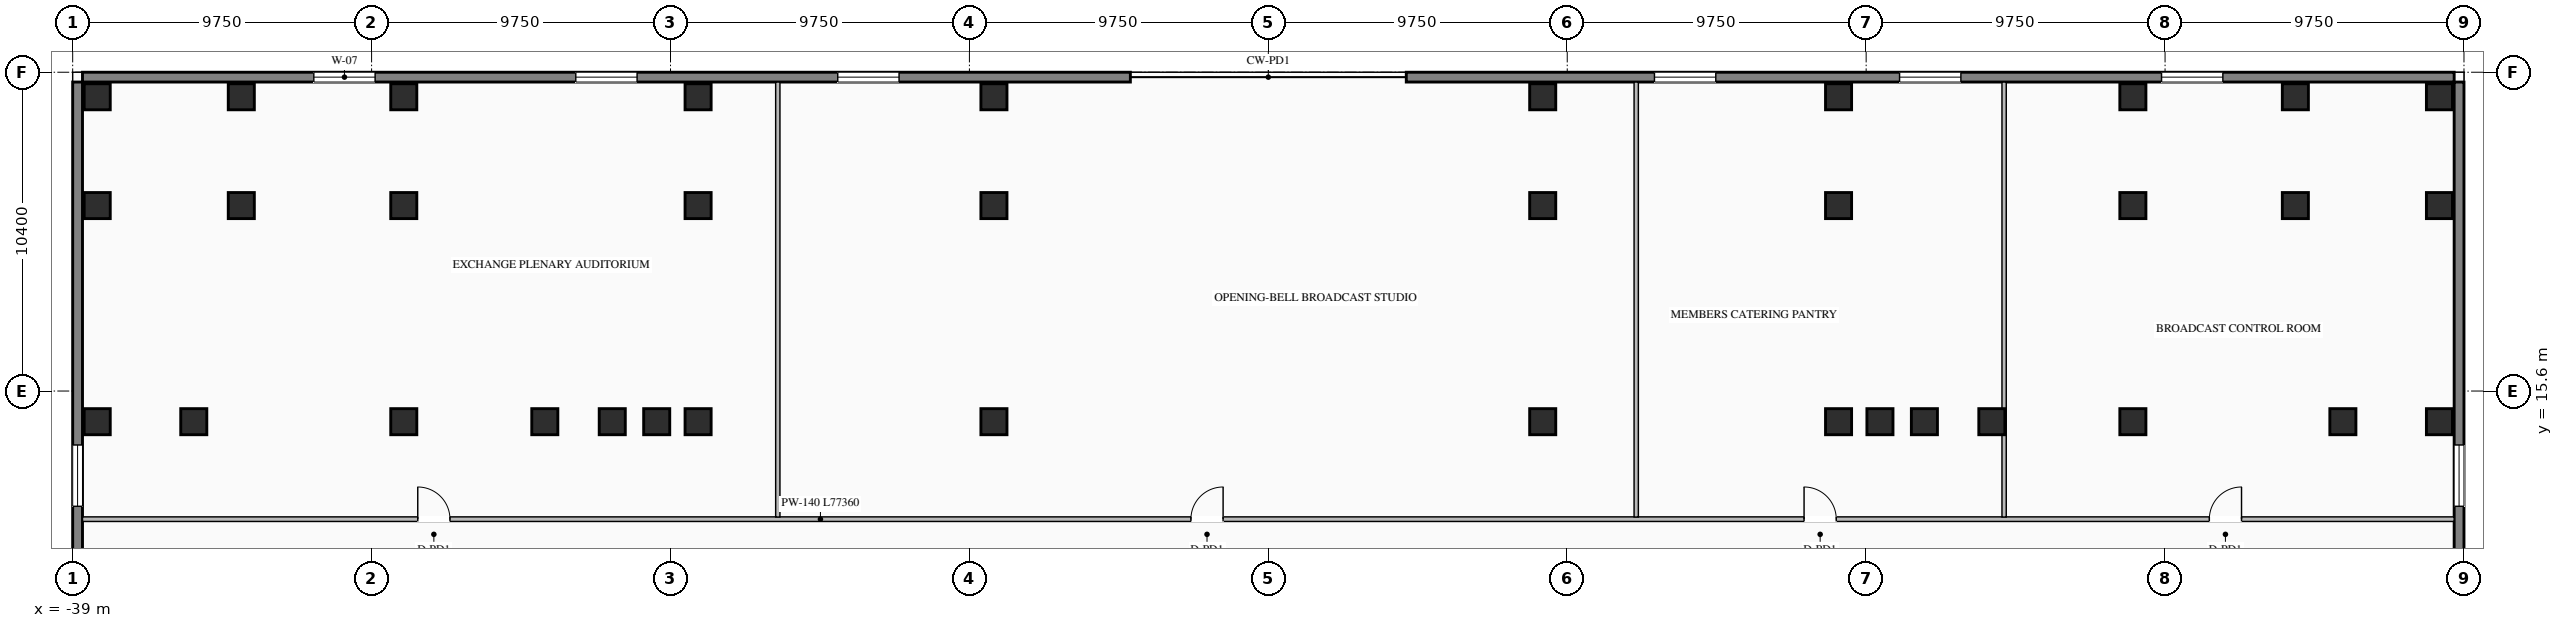
"""IFC4 building model, lengths in metres.
Left out: names, types, materials, properties, quantities, classifications, styles, units other than length and angle.
Written with IfcOpenShell. Run it as: python <this file> out.ifc"""

import sys

from ifc_helpers import new_model, si_unit, direction, frame, frame_2d, origin, origin_2d, place, context, subcontext, project, spatial, rectangle, i_section, extrude, element, fill, save


model = new_model("IFC4")
c1 = context("Model", 3, precision=1e-05, world=origin(), true_north=direction((0.0, 1.0)))
c2 = subcontext(c1, "Body", "Model", "MODEL_VIEW")
j1 = project(units=[si_unit("LENGTHUNIT", "METRE"), si_unit("PLANEANGLEUNIT", "RADIAN")], contexts=[c1])
p1 = place(None, origin())
s1 = spatial("IfcSite", under=j1, at=p1, CompositionType="ELEMENT")
p2 = place(p1, origin())
s2 = spatial("IfcBuilding", under=s1, at=p2, CompositionType="ELEMENT")
p3 = place(p2, frame((0.0, 0.0, 14.1)))
s3 = spatial("IfcBuildingStorey", under=s2, at=p3, CompositionType="ELEMENT", Elevation=14.1)
for number, where, z_axis, x_axis in (
    (1, (-21.4, 14.6, 0.0), (0.0, 0.0, 1.0), (1.0, 0.0, 0.0)),
    (2, (-19.95, 14.6, 0.0), (0.0, 0.0, 1.0), (1.0, 0.0, 0.0)),
    (3, (-18.6, 14.6, 0.0), (0.0, 0.0, 1.0), (1.0, 0.0, 0.0)),
    (4, (-8.95, 14.6, 0.0), (0.0, 0.0, 1.0), (1.0, 0.0, 0.0)),
    (5, (8.95, 14.6, 0.0), (0.0, 0.0, 1.0), (1.0, 0.0, 0.0)),
    (6, (18.6, 14.6, 0.0), (0.0, 0.0, 1.0), (1.0, 0.0, 0.0)),
    (7, (19.95, 14.6, 0.0), (0.0, 0.0, 1.0), (1.0, 0.0, 0.0)),
    (8, (21.4, 14.6, 0.0), (0.0, 0.0, 1.0), (1.0, 0.0, 0.0)),
    (9, (-23.6, 14.6, 0.0), (0.0, 0.0, 1.0), (1.0, 0.0, 0.0)),
    (10, (23.6, 14.6, 0.0), (0.0, 0.0, 1.0), (1.0, 0.0, 0.0)),
    (11, (-28.2, 14.6, 0.0), (0.0, 0.0, 1.0), (1.0, 0.0, 0.0)),
    (12, (28.2, 14.6, 0.0), (0.0, 0.0, 1.0), (1.0, 0.0, 0.0)),
    (13, (-35.05, 14.6, 0.0), (0.0, 0.0, 1.0), (1.0, 0.0, 0.0)),
    (14, (35.05, 14.6, 0.0), (0.0, 0.0, 1.0), (1.0, 0.0, 0.0)),
    (15, (-38.2, 21.65, 0.0), (0.0, 0.0, 1.0), (1.0, 0.0, 0.0)),
    (16, (-33.5, 21.65, 0.0), (0.0, 0.0, 1.0), (1.0, 0.0, 0.0)),
    (17, (-28.2, 21.65, 0.0), (0.0, 0.0, 1.0), (1.0, 0.0, 0.0)),
    (18, (-18.6, 21.65, 0.0), (0.0, 0.0, 1.0), (1.0, 0.0, 0.0)),
    (19, (-8.95, 21.65, 0.0), (0.0, 0.0, 1.0), (1.0, 0.0, 0.0)),
    (20, (8.95, 21.65, 0.0), (0.0, 0.0, 1.0), (1.0, 0.0, 0.0)),
    (21, (18.6, 21.65, 0.0), (0.0, 0.0, 1.0), (1.0, 0.0, 0.0)),
    (22, (28.2, 21.65, 0.0), (0.0, 0.0, 1.0), (1.0, 0.0, 0.0)),
    (23, (33.5, 21.65, 0.0), (0.0, 0.0, 1.0), (1.0, 0.0, 0.0)),
    (24, (38.2, 21.65, 0.0), (0.0, 0.0, 1.0), (1.0, 0.0, 0.0)),
    (25, (-38.2, 25.2, 0.0), (0.0, 0.0, 1.0), (1.0, 0.0, 0.0)),
    (26, (-33.5, 25.2, 0.0), (0.0, 0.0, 1.0), (1.0, 0.0, 0.0)),
    (27, (-28.2, 25.2, 0.0), (0.0, 0.0, 1.0), (1.0, 0.0, 0.0)),
    (28, (-18.6, 25.2, 0.0), (0.0, 0.0, 1.0), (1.0, 0.0, 0.0)),
    (29, (-8.95, 25.2, 0.0), (0.0, 0.0, 1.0), (1.0, 0.0, 0.0)),
    (30, (8.95, 25.2, 0.0), (0.0, 0.0, 1.0), (1.0, 0.0, 0.0)),
    (31, (18.6, 25.2, 0.0), (0.0, 0.0, 1.0), (1.0, 0.0, 0.0)),
    (32, (28.2, 25.2, 0.0), (0.0, 0.0, 1.0), (1.0, 0.0, 0.0)),
    (33, (33.5, 25.2, 0.0), (0.0, 0.0, 1.0), (1.0, 0.0, 0.0)),
    (34, (38.2, 25.2, 0.0), (0.0, 0.0, 1.0), (1.0, 0.0, 0.0)),
    (35, (-38.2, 14.6, 0.0), (0.0, 0.0, 1.0), (1.0, 0.0, 0.0)),
    (36, (38.2, 14.6, 0.0), (0.0, 0.0, 1.0), (1.0, 0.0, 0.0)),
):
    element("IfcColumn", number, at=place(p3, frame(where, z_axis=z_axis, x_axis=x_axis)), inside=s3, PredefinedType="COLUMN", context=c2, shape_type="SweptSolid", body=[
        extrude(i_section(OverallWidth=0.85, OverallDepth=0.85, WebThickness=0.032, FlangeThickness=0.048, at=origin_2d()), origin(), (0.0, 0.0, 1.0), 4.5),
    ])
p4 = place(p3, frame((-38.68, 25.84, 0.0), z_axis=(0.0, 0.0, 1.0), x_axis=(1.0, 0.0, 0.0)))
e37 = element("IfcWall", 37, at=p4, inside=s3, PredefinedType="STANDARD", context=c2, shape_type="SweptSolid", body=[
    extrude(rectangle(XDim=34.18, YDim=0.32, at=frame_2d((17.09, 0.0))), origin(), (0.0, 0.0, 1.0), 4.23),
])
p5 = place(p4, frame((7.545, 0.0, 0.8)))
e38 = element("IfcOpeningElement", 38, at=p5, cuts=e37, PredefinedType="OPENING", context=c2, shape_type="SweptSolid", body=[
    extrude(rectangle(XDim=2.0, YDim=2.2, at=frame_2d((1.0, 1.1))), frame((0.0, 0.17, 0.0), z_axis=(0.0, -1.0, 0.0), x_axis=(1.0, 0.0, 0.0)), (0.0, 0.0, 1.0), 0.34),
])
p6 = place(p4, frame((16.09, 0.0, 0.8)))
e39 = element("IfcOpeningElement", 39, at=p6, cuts=e37, PredefinedType="OPENING", context=c2, shape_type="SweptSolid", body=[
    extrude(rectangle(XDim=2.0, YDim=2.2, at=frame_2d((1.0, 1.1))), frame((0.0, 0.17, 0.0), z_axis=(0.0, -1.0, 0.0), x_axis=(1.0, 0.0, 0.0)), (0.0, 0.0, 1.0), 0.34),
])
p7 = place(p4, frame((24.635, 0.0, 0.8)))
e40 = element("IfcOpeningElement", 40, at=p7, cuts=e37, PredefinedType="OPENING", context=c2, shape_type="SweptSolid", body=[
    extrude(rectangle(XDim=2.0, YDim=2.2, at=frame_2d((1.0, 1.1))), frame((0.0, 0.17, 0.0), z_axis=(0.0, -1.0, 0.0), x_axis=(1.0, 0.0, 0.0)), (0.0, 0.0, 1.0), 0.34),
])
p8 = place(p3, frame((4.5, 25.84, 0.0), z_axis=(0.0, 0.0, 1.0), x_axis=(1.0, 0.0, 0.0)))
e41 = element("IfcWall", 41, at=p8, inside=s3, PredefinedType="STANDARD", context=c2, shape_type="SweptSolid", body=[
    extrude(rectangle(XDim=34.18, YDim=0.32, at=frame_2d((17.09, 0.0))), origin(), (0.0, 0.0, 1.0), 4.23),
])
p9 = place(p8, frame((8.095, 0.0, 0.8)))
e42 = element("IfcOpeningElement", 42, at=p9, cuts=e41, PredefinedType="OPENING", context=c2, shape_type="SweptSolid", body=[
    extrude(rectangle(XDim=2.0, YDim=2.2, at=frame_2d((1.0, 1.1))), frame((0.0, 0.17, 0.0), z_axis=(0.0, -1.0, 0.0), x_axis=(1.0, 0.0, 0.0)), (0.0, 0.0, 1.0), 0.34),
])
p10 = place(p8, frame((16.09, 0.0, 0.8)))
e43 = element("IfcOpeningElement", 43, at=p10, cuts=e41, PredefinedType="OPENING", context=c2, shape_type="SweptSolid", body=[
    extrude(rectangle(XDim=2.0, YDim=2.2, at=frame_2d((1.0, 1.1))), frame((0.0, 0.17, 0.0), z_axis=(0.0, -1.0, 0.0), x_axis=(1.0, 0.0, 0.0)), (0.0, 0.0, 1.0), 0.34),
])
p11 = place(p8, frame((24.635, 0.0, 0.8)))
e44 = element("IfcOpeningElement", 44, at=p11, cuts=e41, PredefinedType="OPENING", context=c2, shape_type="SweptSolid", body=[
    extrude(rectangle(XDim=2.0, YDim=2.2, at=frame_2d((1.0, 1.1))), frame((0.0, 0.17, 0.0), z_axis=(0.0, -1.0, 0.0), x_axis=(1.0, 0.0, 0.0)), (0.0, 0.0, 1.0), 0.34),
])
p12 = place(p3, frame((-38.84, -25.68, 0.0), z_axis=(0.0, 0.0, 1.0), x_axis=(0.0, 1.0, 0.0)))
e45 = element("IfcWall", 45, at=p12, inside=s3, PredefinedType="STANDARD", context=c2, shape_type="SweptSolid", body=[
    extrude(rectangle(XDim=51.36, YDim=0.32, at=frame_2d((25.68, 0.0))), origin(), (0.0, 0.0, 1.0), 4.23),
])
p13 = place(p12, frame((11.84, 0.0, 0.8)))
e46 = element("IfcOpeningElement", 46, at=p13, cuts=e45, PredefinedType="OPENING", context=c2, shape_type="SweptSolid", body=[
    extrude(rectangle(XDim=2.0, YDim=2.2, at=frame_2d((1.0, 1.1))), frame((0.0, 0.17, 0.0), z_axis=(0.0, -1.0, 0.0), x_axis=(1.0, 0.0, 0.0)), (0.0, 0.0, 1.0), 0.34),
])
p14 = place(p12, frame((24.68, 0.0, 0.8)))
e47 = element("IfcOpeningElement", 47, at=p14, cuts=e45, PredefinedType="OPENING", context=c2, shape_type="SweptSolid", body=[
    extrude(rectangle(XDim=2.0, YDim=2.2, at=frame_2d((1.0, 1.1))), frame((0.0, 0.17, 0.0), z_axis=(0.0, -1.0, 0.0), x_axis=(1.0, 0.0, 0.0)), (0.0, 0.0, 1.0), 0.34),
])
p15 = place(p12, frame((37.52, 0.0, 0.8)))
e48 = element("IfcOpeningElement", 48, at=p15, cuts=e45, PredefinedType="OPENING", context=c2, shape_type="SweptSolid", body=[
    extrude(rectangle(XDim=2.0, YDim=2.2, at=frame_2d((1.0, 1.1))), frame((0.0, 0.17, 0.0), z_axis=(0.0, -1.0, 0.0), x_axis=(1.0, 0.0, 0.0)), (0.0, 0.0, 1.0), 0.34),
])
p16 = place(p3, frame((38.84, 25.68, 0.0), z_axis=(0.0, 0.0, 1.0), x_axis=(0.0, -1.0, 0.0)))
e49 = element("IfcWall", 49, at=p16, inside=s3, PredefinedType="STANDARD", context=c2, shape_type="SweptSolid", body=[
    extrude(rectangle(XDim=51.36, YDim=0.32, at=frame_2d((25.68, 0.0))), origin(), (0.0, 0.0, 1.0), 4.23),
])
p17 = place(p16, frame((11.84, 0.0, 0.8)))
e50 = element("IfcOpeningElement", 50, at=p17, cuts=e49, PredefinedType="OPENING", context=c2, shape_type="SweptSolid", body=[
    extrude(rectangle(XDim=2.0, YDim=2.2, at=frame_2d((1.0, 1.1))), frame((0.0, 0.17, 0.0), z_axis=(0.0, -1.0, 0.0), x_axis=(1.0, 0.0, 0.0)), (0.0, 0.0, 1.0), 0.34),
])
p18 = place(p16, frame((24.68, 0.0, 0.8)))
e51 = element("IfcOpeningElement", 51, at=p18, cuts=e49, PredefinedType="OPENING", context=c2, shape_type="SweptSolid", body=[
    extrude(rectangle(XDim=2.0, YDim=2.2, at=frame_2d((1.0, 1.1))), frame((0.0, 0.17, 0.0), z_axis=(0.0, -1.0, 0.0), x_axis=(1.0, 0.0, 0.0)), (0.0, 0.0, 1.0), 0.34),
])
p19 = place(p16, frame((37.52, 0.0, 0.8)))
e52 = element("IfcOpeningElement", 52, at=p19, cuts=e49, PredefinedType="OPENING", context=c2, shape_type="SweptSolid", body=[
    extrude(rectangle(XDim=2.0, YDim=2.2, at=frame_2d((1.0, 1.1))), frame((0.0, 0.17, 0.0), z_axis=(0.0, -1.0, 0.0), x_axis=(1.0, 0.0, 0.0)), (0.0, 0.0, 1.0), 0.34),
])
p20 = place(p3, frame((-38.68, 11.42, 0.0), z_axis=(0.0, 0.0, 1.0), x_axis=(1.0, 0.0, 0.0)))
e53 = element("IfcWall", 53, at=p20, inside=s3, PredefinedType="STANDARD", context=c2, shape_type="SweptSolid", body=[
    extrude(rectangle(XDim=77.36, YDim=0.15, at=frame_2d((38.68, 0.0))), origin(), (0.0, 0.0, 1.0), 4.23),
])
p21 = place(p20, frame((10.936, 0.0, 0.0)))
e54 = element("IfcOpeningElement", 54, at=p21, cuts=e53, PredefinedType="OPENING", context=c2, shape_type="SweptSolid", body=[
    extrude(rectangle(XDim=1.05, YDim=2.08, at=frame_2d((0.525, 1.04))), frame((0.0, 0.085, 0.0), z_axis=(0.0, -1.0, 0.0), x_axis=(1.0, 0.0, 0.0)), (0.0, 0.0, 1.0), 0.17),
])
p22 = place(p20, frame((36.155, 0.0, 0.0)))
e55 = element("IfcOpeningElement", 55, at=p22, cuts=e53, PredefinedType="OPENING", context=c2, shape_type="SweptSolid", body=[
    extrude(rectangle(XDim=1.05, YDim=2.08, at=frame_2d((0.525, 1.04))), frame((0.0, 0.085, 0.0), z_axis=(0.0, -1.0, 0.0), x_axis=(1.0, 0.0, 0.0)), (0.0, 0.0, 1.0), 0.17),
])
p23 = place(p20, frame((56.155, 0.0, 0.0)))
e56 = element("IfcOpeningElement", 56, at=p23, cuts=e53, PredefinedType="OPENING", context=c2, shape_type="SweptSolid", body=[
    extrude(rectangle(XDim=1.05, YDim=2.08, at=frame_2d((0.525, 1.04))), frame((0.0, 0.085, 0.0), z_axis=(0.0, -1.0, 0.0), x_axis=(1.0, 0.0, 0.0)), (0.0, 0.0, 1.0), 0.17),
])
p24 = place(p20, frame((69.374, 0.0, 0.0)))
e57 = element("IfcOpeningElement", 57, at=p24, cuts=e53, PredefinedType="OPENING", context=c2, shape_type="SweptSolid", body=[
    extrude(rectangle(XDim=1.05, YDim=2.08, at=frame_2d((0.525, 1.04))), frame((0.0, 0.085, 0.0), z_axis=(0.0, -1.0, 0.0), x_axis=(1.0, 0.0, 0.0)), (0.0, 0.0, 1.0), 0.17),
])
for number, where, z_axis, x_axis in (
    (58, (-16.0, 11.49, 0.0), (0.0, 0.0, 1.0), (0.0, 1.0, 0.0)),
    (59, (12.0, 11.49, 0.0), (0.0, 0.0, 1.0), (0.0, 1.0, 0.0)),
    (60, (24.0, 11.49, 0.0), (0.0, 0.0, 1.0), (0.0, 1.0, 0.0)),
):
    element("IfcWall", number, at=place(p3, frame(where, z_axis=z_axis, x_axis=x_axis)), inside=s3, PredefinedType="STANDARD", context=c2, shape_type="SweptSolid", body=[
        extrude(rectangle(XDim=14.19, YDim=0.14, at=frame_2d((7.095, 0.0))), origin(), (0.0, 0.0, 1.0), 4.23),
    ])
p25 = place(p5, origin())
e61 = element("IfcWindow", 61, at=p25, inside=s3, PartitioningType="DOUBLE_PANEL_VERTICAL", PredefinedType="WINDOW", context=c2, shape_type="SweptSolid", body=[
    extrude(rectangle(XDim=2.0, YDim=2.2, at=frame_2d((1.0, 1.1))), frame((0.0, 0.03, 0.0), z_axis=(0.0, -1.0, 0.0), x_axis=(1.0, 0.0, 0.0)), (0.0, 0.0, 1.0), 0.06),
])
fill(e38, e61)
p26 = place(p6, origin())
e62 = element("IfcWindow", 62, at=p26, inside=s3, PartitioningType="DOUBLE_PANEL_VERTICAL", PredefinedType="WINDOW", context=c2, shape_type="SweptSolid", body=[
    extrude(rectangle(XDim=2.0, YDim=2.2, at=frame_2d((1.0, 1.1))), frame((0.0, 0.03, 0.0), z_axis=(0.0, -1.0, 0.0), x_axis=(1.0, 0.0, 0.0)), (0.0, 0.0, 1.0), 0.06),
])
fill(e39, e62)
p27 = place(p7, origin())
e63 = element("IfcWindow", 63, at=p27, inside=s3, PartitioningType="DOUBLE_PANEL_VERTICAL", PredefinedType="WINDOW", context=c2, shape_type="SweptSolid", body=[
    extrude(rectangle(XDim=2.0, YDim=2.2, at=frame_2d((1.0, 1.1))), frame((0.0, 0.03, 0.0), z_axis=(0.0, -1.0, 0.0), x_axis=(1.0, 0.0, 0.0)), (0.0, 0.0, 1.0), 0.06),
])
fill(e40, e63)
p28 = place(p9, origin())
e64 = element("IfcWindow", 64, at=p28, inside=s3, PartitioningType="DOUBLE_PANEL_VERTICAL", PredefinedType="WINDOW", context=c2, shape_type="SweptSolid", body=[
    extrude(rectangle(XDim=2.0, YDim=2.2, at=frame_2d((1.0, 1.1))), frame((0.0, 0.03, 0.0), z_axis=(0.0, -1.0, 0.0), x_axis=(1.0, 0.0, 0.0)), (0.0, 0.0, 1.0), 0.06),
])
fill(e42, e64)
p29 = place(p10, origin())
e65 = element("IfcWindow", 65, at=p29, inside=s3, PartitioningType="DOUBLE_PANEL_VERTICAL", PredefinedType="WINDOW", context=c2, shape_type="SweptSolid", body=[
    extrude(rectangle(XDim=2.0, YDim=2.2, at=frame_2d((1.0, 1.1))), frame((0.0, 0.03, 0.0), z_axis=(0.0, -1.0, 0.0), x_axis=(1.0, 0.0, 0.0)), (0.0, 0.0, 1.0), 0.06),
])
fill(e43, e65)
p30 = place(p11, origin())
e66 = element("IfcWindow", 66, at=p30, inside=s3, PartitioningType="DOUBLE_PANEL_VERTICAL", PredefinedType="WINDOW", context=c2, shape_type="SweptSolid", body=[
    extrude(rectangle(XDim=2.0, YDim=2.2, at=frame_2d((1.0, 1.1))), frame((0.0, 0.03, 0.0), z_axis=(0.0, -1.0, 0.0), x_axis=(1.0, 0.0, 0.0)), (0.0, 0.0, 1.0), 0.06),
])
fill(e44, e66)
p31 = place(p15, origin())
e67 = element("IfcWindow", 67, at=p31, inside=s3, PartitioningType="DOUBLE_PANEL_VERTICAL", PredefinedType="WINDOW", context=c2, shape_type="SweptSolid", body=[
    extrude(rectangle(XDim=2.0, YDim=2.2, at=frame_2d((1.0, 1.1))), frame((0.0, 0.03, 0.0), z_axis=(0.0, -1.0, 0.0), x_axis=(1.0, 0.0, 0.0)), (0.0, 0.0, 1.0), 0.06),
])
fill(e48, e67)
p32 = place(p17, origin())
e68 = element("IfcWindow", 68, at=p32, inside=s3, PartitioningType="DOUBLE_PANEL_VERTICAL", PredefinedType="WINDOW", context=c2, shape_type="SweptSolid", body=[
    extrude(rectangle(XDim=2.0, YDim=2.2, at=frame_2d((1.0, 1.1))), frame((0.0, 0.03, 0.0), z_axis=(0.0, -1.0, 0.0), x_axis=(1.0, 0.0, 0.0)), (0.0, 0.0, 1.0), 0.06),
])
fill(e50, e68)
p33 = place(p21, origin())
e69 = element("IfcDoor", 69, at=p33, inside=s3, OperationType="SINGLE_SWING_LEFT", PredefinedType="DOOR", context=c2, shape_type="SweptSolid", body=[
    extrude(rectangle(XDim=1.05, YDim=2.08, at=frame_2d((0.525, 1.04))), frame((0.0, 0.025, 0.0), z_axis=(0.0, -1.0, 0.0), x_axis=(1.0, 0.0, 0.0)), (0.0, 0.0, 1.0), 0.05),
])
fill(e54, e69)
p34 = place(p22, origin())
e70 = element("IfcDoor", 70, at=p34, inside=s3, OperationType="SINGLE_SWING_RIGHT", PredefinedType="DOOR", context=c2, shape_type="SweptSolid", body=[
    extrude(rectangle(XDim=1.05, YDim=2.08, at=frame_2d((0.525, 1.04))), frame((0.0, 0.025, 0.0), z_axis=(0.0, -1.0, 0.0), x_axis=(1.0, 0.0, 0.0)), (0.0, 0.0, 1.0), 0.05),
])
fill(e55, e70)
p35 = place(p23, origin())
e71 = element("IfcDoor", 71, at=p35, inside=s3, OperationType="SINGLE_SWING_LEFT", PredefinedType="DOOR", context=c2, shape_type="SweptSolid", body=[
    extrude(rectangle(XDim=1.05, YDim=2.08, at=frame_2d((0.525, 1.04))), frame((0.0, 0.025, 0.0), z_axis=(0.0, -1.0, 0.0), x_axis=(1.0, 0.0, 0.0)), (0.0, 0.0, 1.0), 0.05),
])
fill(e56, e71)
p36 = place(p24, origin())
e72 = element("IfcDoor", 72, at=p36, inside=s3, OperationType="SINGLE_SWING_RIGHT", PredefinedType="DOOR", context=c2, shape_type="SweptSolid", body=[
    extrude(rectangle(XDim=1.05, YDim=2.08, at=frame_2d((0.525, 1.04))), frame((0.0, 0.025, 0.0), z_axis=(0.0, -1.0, 0.0), x_axis=(1.0, 0.0, 0.0)), (0.0, 0.0, 1.0), 0.05),
])
fill(e57, e72)
save(model, sys.argv[1])
